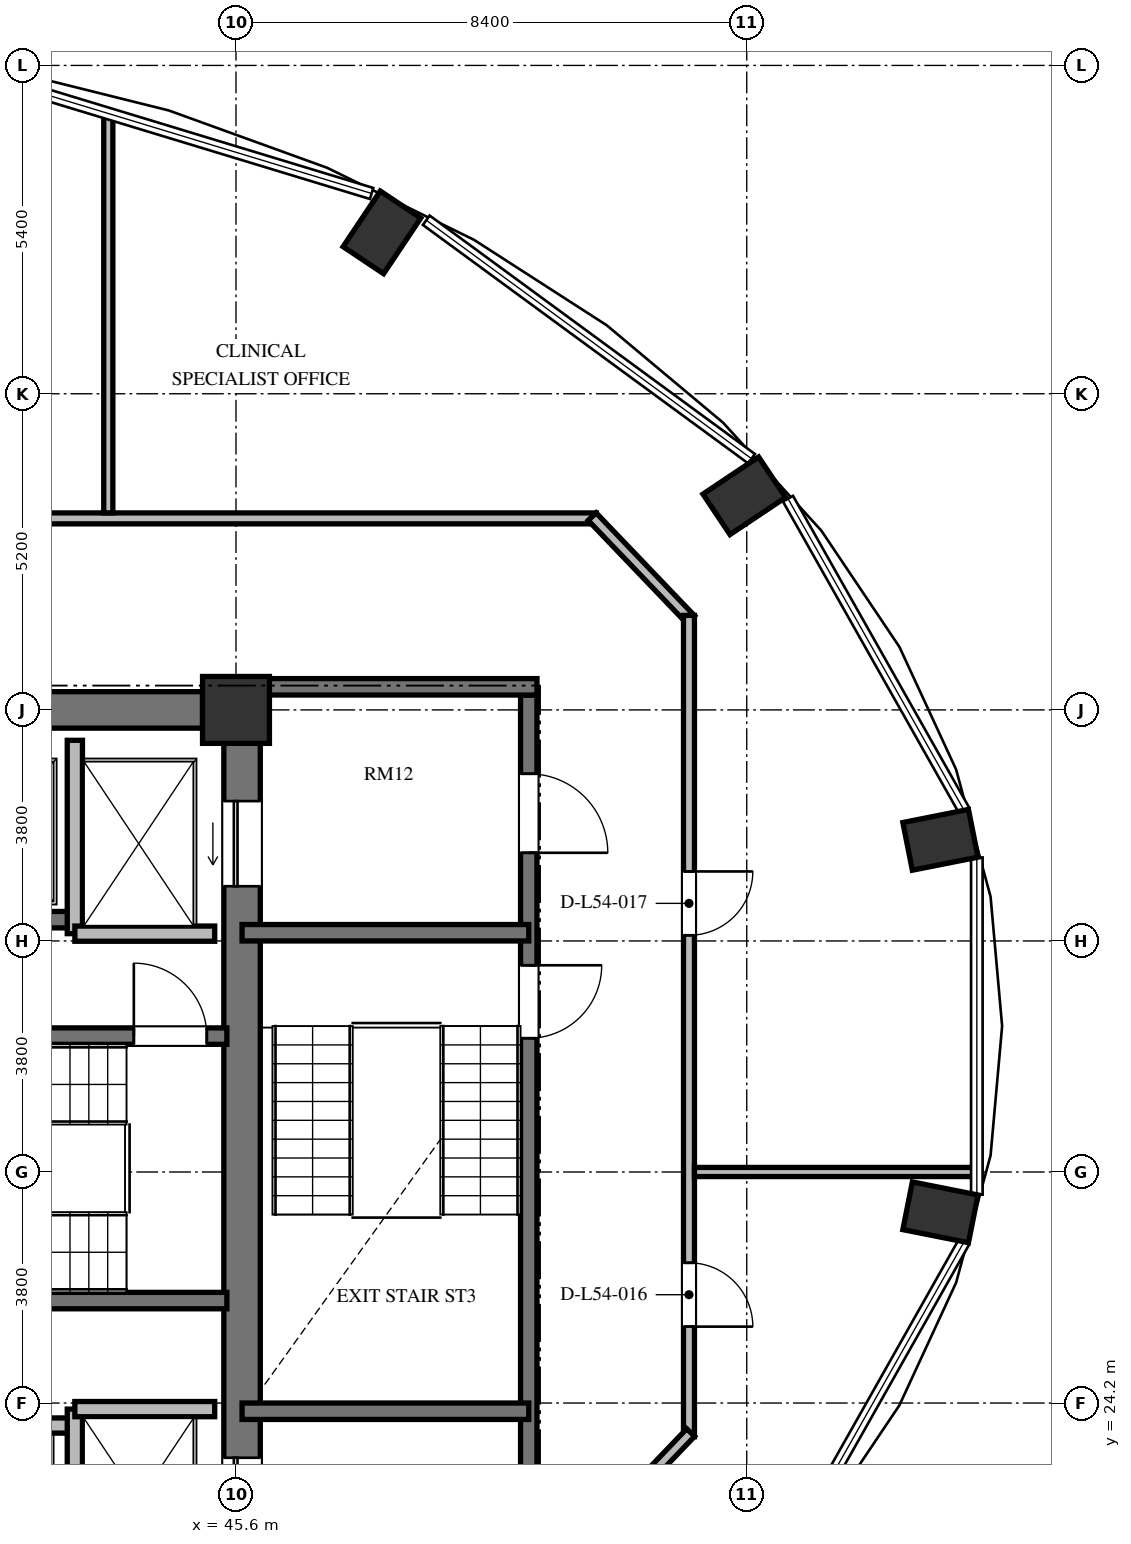
"""IFC4 building model, lengths in metres.
Left out: names, types, materials, properties, quantities, classifications, styles, units other than length and angle.
Written with IfcOpenShell. Run it as: python <this file> out.ifc"""

import sys

from ifc_helpers import new_model, si_unit, direction, frame, frame_2d, origin, origin_2d, place, context, subcontext, project, spatial, rectangle, extrude, element, fill, save


model = new_model("IFC4")
c1 = context("Model", 3, precision=1e-05, world=origin(), true_north=direction((0.0, 1.0)))
c2 = subcontext(c1, "Body", "Model", "MODEL_VIEW")
j1 = project(units=[si_unit("LENGTHUNIT", "METRE"), si_unit("PLANEANGLEUNIT", "RADIAN")], contexts=[c1])
p1 = place(None, origin())
s1 = spatial("IfcSite", under=j1, at=p1, CompositionType="ELEMENT")
p2 = place(p1, origin())
s2 = spatial("IfcBuilding", under=s1, at=p2, CompositionType="ELEMENT")
p3 = place(p2, frame((0.0, 0.0, 209.424)))
s3 = spatial("IfcBuildingStorey", under=s2, at=p3, CompositionType="ELEMENT", Elevation=209.424)
for number, where, z_axis, x_axis in (
    (1, (57.185, 27.337, 0.0), (0.0, 0.0, 1.0), (0.981, -0.195, 0.0)),
    (2, (57.185, 33.463, 0.0), (0.0, 0.0, 1.0), (0.981, 0.195, 0.0)),
    (3, (53.96, 39.123, 0.0), (0.0, 0.0, 1.0), (0.831, 0.556, 0.0)),
    (4, (48.0, 43.454, 0.0), (0.0, 0.0, 1.0), (0.556, 0.831, 0.0)),
):
    element("IfcColumn", number, at=place(p3, frame(where, z_axis=z_axis, x_axis=x_axis)), inside=s3, PredefinedType="COLUMN", context=c2, shape_type="SweptSolid", body=[
        extrude(rectangle(XDim=1.1, YDim=0.8, at=origin_2d()), origin(), (0.0, 0.0, 1.0), 3.648),
    ])
p4 = place(p3, frame((45.6, 35.6, 0.0), z_axis=(0.0, 0.0, 1.0), x_axis=(1.0, 0.0, 0.0)))
e5 = element("IfcColumn", 5, at=p4, inside=s3, PredefinedType="COLUMN", context=c2, shape_type="SweptSolid", body=[
    extrude(rectangle(XDim=1.1, YDim=1.1, at=origin_2d()), origin(), (0.0, 0.0, 1.0), 3.648),
])
p5 = place(p3, frame((45.7, 20.95, 0.0), z_axis=(0.0, 0.0, 1.0), x_axis=(0.0, 1.0, 0.0)))
e6 = element("IfcWall", 6, at=p5, inside=s3, PredefinedType="SHEAR", context=c2, shape_type="SweptSolid", body=[
    extrude(rectangle(XDim=14.1, YDim=0.6, at=frame_2d((7.05, 0.0))), origin(), (0.0, 0.0, 1.0), 3.648),
])
p6 = place(p5, frame((11.75, 0.0, 0.0)))
e7 = element("IfcOpeningElement", 7, at=p6, cuts=e6, PredefinedType="OPENING", context=c2, shape_type="SweptSolid", body=[
    extrude(rectangle(XDim=1.4, YDim=2.3, at=frame_2d((0.7, 1.15))), frame((0.0, 0.31, 0.0), z_axis=(0.0, -1.0, 0.0), x_axis=(1.0, 0.0, 0.0)), (0.0, 0.0, 1.0), 0.62),
])
p7 = place(p5, frame((0.95, 0.0, 0.0)))
e8 = element("IfcOpeningElement", 8, at=p7, cuts=e6, PredefinedType="OPENING", context=c2, shape_type="SweptSolid", body=[
    extrude(rectangle(XDim=1.4, YDim=2.3, at=frame_2d((0.7, 1.15))), frame((0.0, 0.31, 0.0), z_axis=(0.0, -1.0, 0.0), x_axis=(1.0, 0.0, 0.0)), (0.0, 0.0, 1.0), 0.62),
])
p8 = place(p3, frame((39.6, 35.6, 0.0), z_axis=(0.0, 0.0, 1.0), x_axis=(1.0, 0.0, 0.0)))
e9 = element("IfcWall", 9, at=p8, inside=s3, PredefinedType="SHEAR", context=c2, shape_type="SweptSolid", body=[
    extrude(rectangle(XDim=5.45, YDim=0.6, at=frame_2d((2.725, 0.0))), origin(), (0.0, 0.0, 1.0), 3.648),
])
p9 = place(p3, frame((37.465, 30.235, 0.0), z_axis=(0.0, 0.0, 1.0), x_axis=(1.0, 0.0, 0.0)))
e10 = element("IfcWall", 10, at=p9, inside=s3, PredefinedType="SHEAR", context=c2, shape_type="SweptSolid", body=[
    extrude(rectangle(XDim=7.985, YDim=0.27, at=frame_2d((3.992, 0.0))), origin(), (0.0, 0.0, 1.0), 3.648),
])
p10 = place(p9, frame((6.455, 0.0, 0.0)))
e11 = element("IfcOpeningElement", 11, at=p10, cuts=e10, PredefinedType="OPENING", context=c2, shape_type="SweptSolid", body=[
    extrude(rectangle(XDim=1.2, YDim=2.15, at=frame_2d((0.6, 1.075))), frame((0.0, 0.145, 0.0), z_axis=(0.0, -1.0, 0.0), x_axis=(1.0, 0.0, 0.0)), (0.0, 0.0, 1.0), 0.29),
])
p11 = place(p3, frame((37.465, 25.885, 0.0), z_axis=(0.0, 0.0, 1.0), x_axis=(1.0, 0.0, 0.0)))
e12 = element("IfcWall", 12, at=p11, inside=s3, PredefinedType="SHEAR", context=c2, shape_type="SweptSolid", body=[
    extrude(rectangle(XDim=7.985, YDim=0.27, at=frame_2d((3.992, 0.0))), origin(), (0.0, 0.0, 1.0), 3.648),
])
p12 = place(p3, frame((26.55, 32.15, 0.0), z_axis=(0.0, 0.0, 1.0), x_axis=(1.0, 0.0, 0.0)))
e13 = element("IfcWall", 13, at=p12, inside=s3, PredefinedType="SHEAR", context=c2, shape_type="SweptSolid", body=[
    extrude(rectangle(XDim=16.4, YDim=0.27, at=frame_2d((8.2, 0.0))), origin(), (0.0, 0.0, 1.0), 3.648),
])
p13 = place(p12, frame((1.375, 0.0, 0.0)))
e14 = element("IfcOpeningElement", 14, at=p13, cuts=e13, PredefinedType="OPENING", context=c2, shape_type="SweptSolid", body=[
    extrude(rectangle(XDim=1.05, YDim=2.15, at=frame_2d((0.525, 1.075))), frame((0.0, 0.145, 0.0), z_axis=(0.0, -1.0, 0.0), x_axis=(1.0, 0.0, 0.0)), (0.0, 0.0, 1.0), 0.29),
])
p14 = place(p12, frame((4.975, 0.0, 0.0)))
e15 = element("IfcOpeningElement", 15, at=p14, cuts=e13, PredefinedType="OPENING", context=c2, shape_type="SweptSolid", body=[
    extrude(rectangle(XDim=1.05, YDim=2.15, at=frame_2d((0.525, 1.075))), frame((0.0, 0.145, 0.0), z_axis=(0.0, -1.0, 0.0), x_axis=(1.0, 0.0, 0.0)), (0.0, 0.0, 1.0), 0.29),
])
p15 = place(p12, frame((8.625, 0.0, 0.0)))
e16 = element("IfcOpeningElement", 16, at=p15, cuts=e13, PredefinedType="OPENING", context=c2, shape_type="SweptSolid", body=[
    extrude(rectangle(XDim=1.05, YDim=2.15, at=frame_2d((0.525, 1.075))), frame((0.0, 0.145, 0.0), z_axis=(0.0, -1.0, 0.0), x_axis=(1.0, 0.0, 0.0)), (0.0, 0.0, 1.0), 0.29),
])
p16 = place(p12, frame((11.9, 0.0, 0.0)))
e17 = element("IfcOpeningElement", 17, at=p16, cuts=e13, PredefinedType="OPENING", context=c2, shape_type="SweptSolid", body=[
    extrude(rectangle(XDim=1.1, YDim=2.2, at=frame_2d((0.55, 1.1))), frame((0.0, 0.145, 0.0), z_axis=(0.0, -1.0, 0.0), x_axis=(1.0, 0.0, 0.0)), (0.0, 0.0, 1.0), 0.29),
])
p17 = place(p12, frame((14.5, 0.0, 0.0)))
e18 = element("IfcOpeningElement", 18, at=p17, cuts=e13, PredefinedType="OPENING", context=c2, shape_type="SweptSolid", body=[
    extrude(rectangle(XDim=1.1, YDim=2.2, at=frame_2d((0.55, 1.1))), frame((0.0, 0.145, 0.0), z_axis=(0.0, -1.0, 0.0), x_axis=(1.0, 0.0, 0.0)), (0.0, 0.0, 1.0), 0.29),
])
p18 = place(p3, frame((26.75, 23.83, 0.0), z_axis=(0.0, 0.0, 1.0), x_axis=(1.0, 0.0, 0.0)))
e19 = element("IfcWall", 19, at=p18, inside=s3, PredefinedType="SOLIDWALL", context=c2, shape_type="SweptSolid", body=[
    extrude(rectangle(XDim=16.2, YDim=0.25, at=frame_2d((8.1, 0.0))), origin(), (0.0, 0.0, 1.0), 3.448),
])
p19 = place(p18, frame((2.025, 0.0, 0.0)))
e20 = element("IfcOpeningElement", 20, at=p19, cuts=e19, PredefinedType="OPENING", context=c2, shape_type="SweptSolid", body=[
    extrude(rectangle(XDim=1.05, YDim=2.15, at=frame_2d((0.525, 1.075))), frame((0.0, 0.135, 0.0), z_axis=(0.0, -1.0, 0.0), x_axis=(1.0, 0.0, 0.0)), (0.0, 0.0, 1.0), 0.27),
])
p20 = place(p18, frame((7.25, 0.0, 0.0)))
e21 = element("IfcOpeningElement", 21, at=p20, cuts=e19, PredefinedType="OPENING", context=c2, shape_type="SweptSolid", body=[
    extrude(rectangle(XDim=1.4, YDim=2.2, at=frame_2d((0.7, 1.1))), frame((0.0, 0.135, 0.0), z_axis=(0.0, -1.0, 0.0), x_axis=(1.0, 0.0, 0.0)), (0.0, 0.0, 1.0), 0.27),
])
p21 = place(p18, frame((11.7, 0.0, 0.0)))
e22 = element("IfcOpeningElement", 22, at=p21, cuts=e19, PredefinedType="OPENING", context=c2, shape_type="SweptSolid", body=[
    extrude(rectangle(XDim=1.1, YDim=2.2, at=frame_2d((0.55, 1.1))), frame((0.0, 0.135, 0.0), z_axis=(0.0, -1.0, 0.0), x_axis=(1.0, 0.0, 0.0)), (0.0, 0.0, 1.0), 0.27),
])
p22 = place(p18, frame((14.15, 0.0, 0.0)))
e23 = element("IfcOpeningElement", 23, at=p22, cuts=e19, PredefinedType="OPENING", context=c2, shape_type="SweptSolid", body=[
    extrude(rectangle(XDim=1.4, YDim=2.3, at=frame_2d((0.7, 1.15))), frame((0.0, 0.135, 0.0), z_axis=(0.0, -1.0, 0.0), x_axis=(1.0, 0.0, 0.0)), (0.0, 0.0, 1.0), 0.27),
])
p23 = place(p3, frame((42.95, 31.92, 0.0), z_axis=(0.0, 0.0, 1.0), x_axis=(0.0, 1.0, 0.0)))
e24 = element("IfcWall", 24, at=p23, inside=s3, PredefinedType="SOLIDWALL", context=c2, shape_type="SweptSolid", body=[
    extrude(rectangle(XDim=3.18, YDim=0.25, at=frame_2d((1.59, 0.0))), origin(), (0.0, 0.0, 1.0), 3.448),
])
p24 = place(p3, frame((42.95, 31.92, 0.0), z_axis=(0.0, 0.0, 1.0), x_axis=(1.0, 0.0, 0.0)))
e25 = element("IfcWall", 25, at=p24, inside=s3, PredefinedType="SOLIDWALL", context=c2, shape_type="SweptSolid", body=[
    extrude(rectangle(XDim=2.3, YDim=0.25, at=frame_2d((1.15, 0.0))), origin(), (0.0, 0.0, 1.0), 3.448),
])
p25 = place(p3, frame((42.95, 20.9, 0.0), z_axis=(0.0, 0.0, 1.0), x_axis=(0.0, 1.0, 0.0)))
e26 = element("IfcWall", 26, at=p25, inside=s3, PredefinedType="SOLIDWALL", context=c2, shape_type="SweptSolid", body=[
    extrude(rectangle(XDim=3.2, YDim=0.25, at=frame_2d((1.6, 0.0))), origin(), (0.0, 0.0, 1.0), 3.448),
])
p26 = place(p3, frame((42.95, 24.1, 0.0), z_axis=(0.0, 0.0, 1.0), x_axis=(1.0, 0.0, 0.0)))
e27 = element("IfcWall", 27, at=p26, inside=s3, PredefinedType="SOLIDWALL", context=c2, shape_type="SweptSolid", body=[
    extrude(rectangle(XDim=2.3, YDim=0.25, at=frame_2d((1.15, 0.0))), origin(), (0.0, 0.0, 1.0), 3.448),
])
p27 = place(p3, frame((50.415, 35.845, 0.0), z_axis=(0.0, 0.0, 1.0), x_axis=(0.0, -1.0, 0.0)))
e28 = element("IfcWall", 28, at=p27, inside=s3, PredefinedType="SHEAR", context=c2, shape_type="SweptSolid", body=[
    extrude(rectangle(XDim=15.825, YDim=0.27, at=frame_2d((7.913, 0.0))), origin(), (0.0, 0.0, 1.0), 3.648),
])
p28 = place(p27, frame((4.445, 0.0, 0.0)))
e29 = element("IfcOpeningElement", 29, at=p28, cuts=e28, PredefinedType="OPENING", context=c2, shape_type="SweptSolid", body=[
    extrude(rectangle(XDim=1.2, YDim=2.15, at=frame_2d((0.6, 1.075))), frame((0.0, 0.145, 0.0), z_axis=(0.0, -1.0, 0.0), x_axis=(1.0, 0.0, 0.0)), (0.0, 0.0, 1.0), 0.29),
])
p29 = place(p27, frame((1.295, 0.0, 0.0)))
e30 = element("IfcOpeningElement", 30, at=p29, cuts=e28, PredefinedType="OPENING", context=c2, shape_type="SweptSolid", body=[
    extrude(rectangle(XDim=1.3, YDim=2.2, at=frame_2d((0.65, 1.1))), frame((0.0, 0.145, 0.0), z_axis=(0.0, -1.0, 0.0), x_axis=(1.0, 0.0, 0.0)), (0.0, 0.0, 1.0), 0.29),
])
p30 = place(p27, frame((13.095, 0.0, 0.0)))
e31 = element("IfcOpeningElement", 31, at=p30, cuts=e28, PredefinedType="OPENING", context=c2, shape_type="SweptSolid", body=[
    extrude(rectangle(XDim=1.3, YDim=2.2, at=frame_2d((0.65, 1.1))), frame((0.0, 0.145, 0.0), z_axis=(0.0, -1.0, 0.0), x_axis=(1.0, 0.0, 0.0)), (0.0, 0.0, 1.0), 0.29),
])
p31 = place(p3, frame((46.0, 35.98, 0.0), z_axis=(0.0, 0.0, 1.0), x_axis=(1.0, 0.0, 0.0)))
e32 = element("IfcWall", 32, at=p31, inside=s3, PredefinedType="SHEAR", context=c2, shape_type="SweptSolid", body=[
    extrude(rectangle(XDim=4.55, YDim=0.27, at=frame_2d((2.275, 0.0))), origin(), (0.0, 0.0, 1.0), 3.648),
])
for number, where, z_axis, x_axis in (
    (33, (45.7, 31.935, 0.0), (0.0, 0.0, 1.0), (1.0, 0.0, 0.0)),
    (34, (45.7, 24.065, 0.0), (0.0, 0.0, 1.0), (1.0, 0.0, 0.0)),
):
    element("IfcWall", number, at=place(p3, frame(where, z_axis=z_axis, x_axis=x_axis)), inside=s3, PredefinedType="SHEAR", context=c2, shape_type="SweptSolid", body=[
        extrude(rectangle(XDim=4.715, YDim=0.27, at=frame_2d((2.357, 0.0))), origin(), (0.0, 0.0, 1.0), 3.648),
    ])
p32 = place(p3, frame((30.71, 38.75, 0.0), z_axis=(0.0, 0.0, 1.0), x_axis=(1.0, 0.0, 0.0)))
e35 = element("IfcWall", 35, at=p32, inside=s3, PredefinedType="PARTITIONING", context=c2, shape_type="SweptSolid", body=[
    extrude(rectangle(XDim=20.815, YDim=0.18, at=frame_2d((10.408, 0.0))), origin(), (0.0, 0.0, 1.0), 3.073),
])
p33 = place(p32, frame((7.515, 0.0, 0.0)))
e36 = element("IfcOpeningElement", 36, at=p33, cuts=e35, PredefinedType="OPENING", context=c2, shape_type="SweptSolid", body=[
    extrude(rectangle(XDim=1.05, YDim=2.15, at=frame_2d((0.525, 1.075))), frame((0.0, 0.1, 0.0), z_axis=(0.0, -1.0, 0.0), x_axis=(1.0, 0.0, 0.0)), (0.0, 0.0, 1.0), 0.2),
])
p34 = place(p3, frame((51.458, 38.779, 0.0), z_axis=(0.0, 0.0, 1.0), x_axis=(0.691359830363, -0.722510612352, 0.0)))
e37 = element("IfcWall", 37, at=p34, inside=s3, PredefinedType="PARTITIONING", context=c2, shape_type="SweptSolid", body=[
    extrude(rectangle(XDim=2.343, YDim=0.18, at=frame_2d((1.172, 0.0))), origin(), (0.0, 0.0, 1.0), 3.033),
])
p35 = place(p3, frame((53.05, 37.155, 0.0), z_axis=(0.0, 0.0, 1.0), x_axis=(0.0, -1.0, 0.0)))
e38 = element("IfcWall", 38, at=p35, inside=s3, PredefinedType="PARTITIONING", context=c2, shape_type="SweptSolid", body=[
    extrude(rectangle(XDim=13.509, YDim=0.18, at=frame_2d((6.754, 0.0))), origin(), (0.0, 0.0, 1.0), 3.448),
])
p36 = place(p35, frame((10.648, 0.0, 0.0)))
e39 = element("IfcOpeningElement", 39, at=p36, cuts=e38, PredefinedType="OPENING", context=c2, shape_type="SweptSolid", body=[
    extrude(rectangle(XDim=1.05, YDim=2.15, at=frame_2d((0.525, 1.075))), frame((0.0, 0.1, 0.0), z_axis=(0.0, -1.0, 0.0), x_axis=(1.0, 0.0, 0.0)), (0.0, 0.0, 1.0), 0.2),
])
p37 = place(p35, frame((4.211, 0.0, 0.0)))
e40 = element("IfcOpeningElement", 40, at=p37, cuts=e38, PredefinedType="OPENING", context=c2, shape_type="SweptSolid", body=[
    extrude(rectangle(XDim=1.05, YDim=2.15, at=frame_2d((0.525, 1.075))), frame((0.0, 0.1, 0.0), z_axis=(0.0, -1.0, 0.0), x_axis=(1.0, 0.0, 0.0)), (0.0, 0.0, 1.0), 0.2),
])
p38 = place(p3, frame((53.078, 23.714, 0.0), z_axis=(0.0, 0.0, 1.0), x_axis=(-0.691353379446, -0.722516785085, 0.0)))
e41 = element("IfcWall", 41, at=p38, inside=s3, PredefinedType="PARTITIONING", context=c2, shape_type="SweptSolid", body=[
    extrude(rectangle(XDim=3.604, YDim=0.18, at=frame_2d((1.802, 0.0))), origin(), (0.0, 0.0, 1.0), 3.448),
])
p39 = place(p3, frame((53.14, 28.0, 0.0), z_axis=(0.0, 0.0, 1.0), x_axis=(1.0, 0.0, 0.0)))
e42 = element("IfcWall", 42, at=p39, inside=s3, PredefinedType="PARTITIONING", context=c2, shape_type="SweptSolid", body=[
    extrude(rectangle(XDim=4.632, YDim=0.15, at=frame_2d((2.316, 0.0))), origin(), (0.0, 0.0, 1.0), 3.448),
])
p40 = place(p3, frame((43.5, 38.84, 0.0), z_axis=(0.0, 0.0, 1.0), x_axis=(0.0, 1.0, 0.0)))
e43 = element("IfcWall", 43, at=p40, inside=s3, PredefinedType="PARTITIONING", context=c2, shape_type="SweptSolid", body=[
    extrude(rectangle(XDim=6.552, YDim=0.15, at=frame_2d((3.276, 0.0))), origin(), (0.0, 0.0, 1.0), 3.448),
])
p41 = place(p10, origin())
e44 = element("IfcDoor", 44, at=p41, inside=s3, OperationType="SINGLE_SWING_LEFT", PredefinedType="DOOR", context=c2, shape_type="SweptSolid", body=[
    extrude(rectangle(XDim=1.2, YDim=2.15, at=frame_2d((0.6, 1.075))), frame((0.0, 0.025, 0.0), z_axis=(0.0, -1.0, 0.0), x_axis=(1.0, 0.0, 0.0)), (0.0, 0.0, 1.0), 0.05),
])
fill(e11, e44)
p42 = place(p6, origin())
e45 = element("IfcDoor", 45, at=p42, inside=s3, OperationType="SLIDING_TO_LEFT", PredefinedType="DOOR", context=c2, shape_type="SweptSolid", body=[
    extrude(rectangle(XDim=1.4, YDim=2.3, at=frame_2d((0.7, 1.15))), frame((0.0, 0.025, 0.0), z_axis=(0.0, -1.0, 0.0), x_axis=(1.0, 0.0, 0.0)), (0.0, 0.0, 1.0), 0.05),
])
fill(e7, e45)
p43 = place(p7, origin())
e46 = element("IfcDoor", 46, at=p43, inside=s3, OperationType="SLIDING_TO_LEFT", PredefinedType="DOOR", context=c2, shape_type="SweptSolid", body=[
    extrude(rectangle(XDim=1.4, YDim=2.3, at=frame_2d((0.7, 1.15))), frame((0.0, 0.025, 0.0), z_axis=(0.0, -1.0, 0.0), x_axis=(1.0, 0.0, 0.0)), (0.0, 0.0, 1.0), 0.05),
])
fill(e8, e46)
p44 = place(p28, origin())
e47 = element("IfcDoor", 47, at=p44, inside=s3, OperationType="SINGLE_SWING_LEFT", PredefinedType="DOOR", context=c2, shape_type="SweptSolid", body=[
    extrude(rectangle(XDim=1.2, YDim=2.15, at=frame_2d((0.6, 1.075))), frame((0.0, 0.025, 0.0), z_axis=(0.0, -1.0, 0.0), x_axis=(1.0, 0.0, 0.0)), (0.0, 0.0, 1.0), 0.05),
])
fill(e29, e47)
p45 = place(p29, origin())
e48 = element("IfcDoor", 48, at=p45, inside=s3, OperationType="SINGLE_SWING_RIGHT", PredefinedType="DOOR", context=c2, shape_type="SweptSolid", body=[
    extrude(rectangle(XDim=1.3, YDim=2.2, at=frame_2d((0.65, 1.1))), frame((0.0, 0.025, 0.0), z_axis=(0.0, -1.0, 0.0), x_axis=(1.0, 0.0, 0.0)), (0.0, 0.0, 1.0), 0.05),
])
fill(e30, e48)
p46 = place(p36, origin())
e49 = element("IfcDoor", 49, at=p46, inside=s3, OperationType="SINGLE_SWING_RIGHT", PredefinedType="DOOR", context=c2, shape_type="SweptSolid", body=[
    extrude(rectangle(XDim=1.05, YDim=2.15, at=frame_2d((0.525, 1.075))), frame((0.0, 0.025, 0.0), z_axis=(0.0, -1.0, 0.0), x_axis=(1.0, 0.0, 0.0)), (0.0, 0.0, 1.0), 0.05),
])
fill(e39, e49)
p47 = place(p37, origin())
e50 = element("IfcDoor", 50, at=p47, inside=s3, OperationType="SINGLE_SWING_LEFT", PredefinedType="DOOR", context=c2, shape_type="SweptSolid", body=[
    extrude(rectangle(XDim=1.05, YDim=2.15, at=frame_2d((0.525, 1.075))), frame((0.0, 0.025, 0.0), z_axis=(0.0, -1.0, 0.0), x_axis=(1.0, 0.0, 0.0)), (0.0, 0.0, 1.0), 0.05),
])
fill(e40, e50)
save(model, sys.argv[1])
